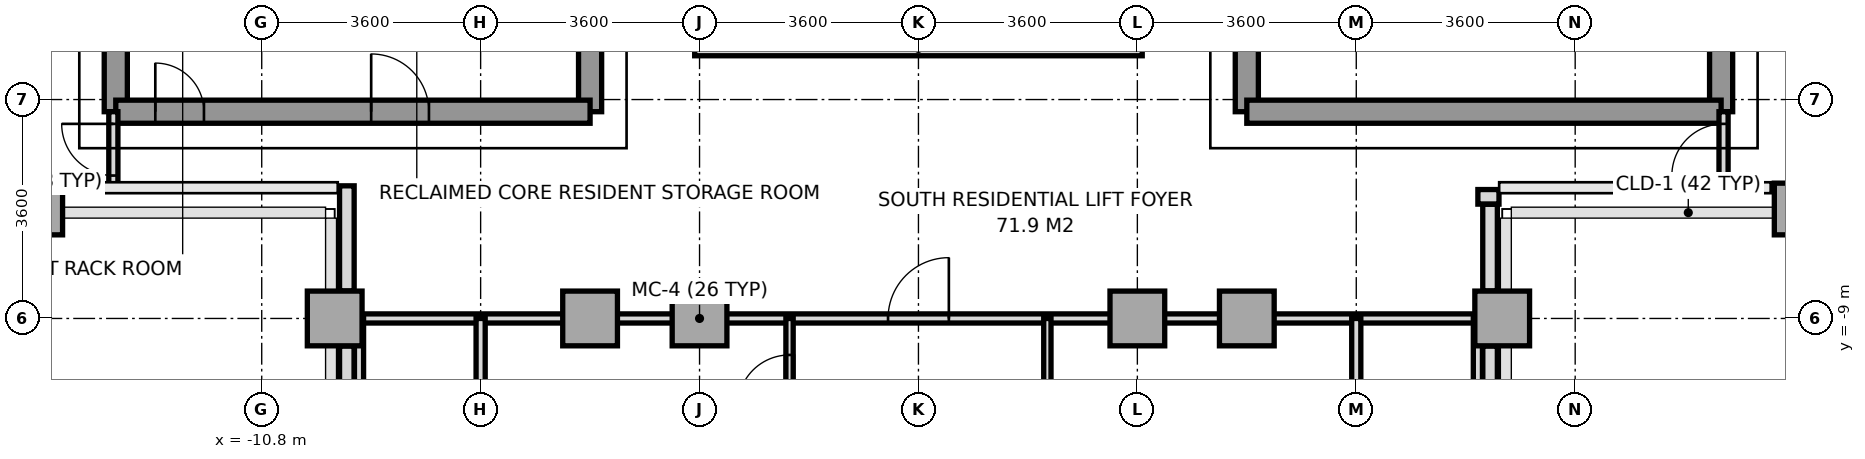
"""IFC4 building model, lengths in metres.
Left out: names, types, materials, properties, quantities, classifications, styles, units other than length and angle.
Written with IfcOpenShell. Run it as: python <this file> out.ifc"""

import sys

from ifc_helpers import new_model, si_unit, direction, frame, frame_2d, origin, origin_2d, place, context, subcontext, project, spatial, rectangle, extrude, source, transform, mapped, element, fill, save


model = new_model("IFC4")
c1 = context("Model", 3, precision=1e-05, world=origin(), true_north=direction((0.0, 1.0)))
c2 = subcontext(c1, "Body", "Model", "MODEL_VIEW")
j1 = project(units=[si_unit("LENGTHUNIT", "METRE"), si_unit("PLANEANGLEUNIT", "RADIAN")], contexts=[c1])
p1 = place(None, origin())
s1 = spatial("IfcSite", under=j1, at=p1, CompositionType="ELEMENT")
p2 = place(p1, origin())
s2 = spatial("IfcBuilding", under=s1, at=p2, CompositionType="ELEMENT")
p3 = place(p2, frame((0.0, 0.0, 204.6)))
s3 = spatial("IfcBuildingStorey", under=s2, at=p3, CompositionType="ELEMENT", Elevation=204.6)
m1 = source(origin(), c2, "Body", "SweptSolid", [
    extrude(rectangle(XDim=0.65, YDim=0.85, at=origin_2d()), origin(), (0.0, 0.0, 1.0), 3.2),
])
p4 = place(p3, frame((-14.4, -7.2, 0.0), z_axis=(0.0, 0.0, 1.0), x_axis=(1.0, 0.0, 0.0)))
e1 = element("IfcColumn", 1, at=p4, inside=s3, PredefinedType="COLUMN", context=c2, shape_type="MappedRepresentation", body=[
    mapped(m1, transform((0.0, 0.0, 0.0), x_axis=(1.0, 0.0, 0.0), y_axis=(0.0, 1.0, 0.0), z_axis=(0.0, 0.0, 1.0), scale=1.0)),
])
m2 = source(origin(), c2, "Body", "SweptSolid", [
    extrude(rectangle(XDim=0.9, YDim=0.9, at=origin_2d()), origin(), (0.0, 0.0, 1.0), 3.2),
])
for number, where, z_axis, x_axis in (
    (2, (-9.6, -9.0, 0.0), (0.0, 0.0, 1.0), (1.0, 0.0, 0.0)),
    (3, (-5.4, -9.0, 0.0), (0.0, 0.0, 1.0), (1.0, 0.0, 0.0)),
    (4, (-3.6, -9.0, 0.0), (0.0, 0.0, 1.0), (1.0, 0.0, 0.0)),
    (5, (3.6, -9.0, 0.0), (0.0, 0.0, 1.0), (1.0, 0.0, 0.0)),
    (6, (5.4, -9.0, 0.0), (0.0, 0.0, 1.0), (1.0, 0.0, 0.0)),
    (7, (9.6, -9.0, 0.0), (0.0, 0.0, 1.0), (1.0, 0.0, 0.0)),
):
    element("IfcColumn", number, at=place(p3, frame(where, z_axis=z_axis, x_axis=x_axis)), inside=s3, PredefinedType="COLUMN", context=c2, shape_type="MappedRepresentation", body=[
        mapped(m2, transform((0.0, 0.0, 0.0), x_axis=(1.0, 0.0, 0.0), y_axis=(0.0, 1.0, 0.0), z_axis=(0.0, 0.0, 1.0), scale=1.0)),
    ])
p5 = place(p3, frame((14.4, -7.2, 0.0), z_axis=(0.0, 0.0, 1.0), x_axis=(1.0, 0.0, 0.0)))
e8 = element("IfcColumn", 8, at=p5, inside=s3, PredefinedType="COLUMN", context=c2, shape_type="MappedRepresentation", body=[
    mapped(m1, transform((0.0, 0.0, 0.0), x_axis=(1.0, 0.0, 0.0), y_axis=(0.0, 1.0, 0.0), z_axis=(0.0, 0.0, 1.0), scale=1.0)),
])
p6 = place(p3, frame((9.547, -7.0, 0.0), z_axis=(0.0, 0.0, 1.0), x_axis=(-1.0, 0.0, 0.0)))
e9 = element("IfcWall", 9, at=p6, inside=s3, PredefinedType="PARAPET", context=c2, shape_type="SweptSolid", body=[
    extrude(rectangle(XDim=0.347, YDim=0.24, at=frame_2d((0.174, 0.0))), origin(), (0.0, 0.0, 1.0), 1.15),
])
p7 = place(p3, frame((9.4, -7.123, 0.0), z_axis=(0.0, 0.0, 1.0), x_axis=(0.0, -1.0, 0.0)))
e10 = element("IfcWall", 10, at=p7, inside=s3, PredefinedType="PARAPET", context=c2, shape_type="SweptSolid", body=[
    extrude(rectangle(XDim=1.424, YDim=0.24, at=frame_2d((0.712, 0.0))), origin(), (0.0, 0.0, 1.0), 1.15),
])
p8 = place(p3, frame((9.4, -9.453, 0.0), z_axis=(0.0, 0.0, 1.0), x_axis=(0.0, -1.0, 0.0)))
e11 = element("IfcWall", 11, at=p8, inside=s3, PredefinedType="PARAPET", context=c2, shape_type="SweptSolid", body=[
    extrude(rectangle(XDim=6.15, YDim=0.24, at=frame_2d((3.075, 0.0))), origin(), (0.0, 0.0, 1.0), 1.15),
])
p9 = place(p3, frame((-9.4, -15.358, 0.0), z_axis=(0.0, 0.0, 1.0), x_axis=(0.0, 1.0, 0.0)))
e12 = element("IfcWall", 12, at=p9, inside=s3, PredefinedType="PARAPET", context=c2, shape_type="SweptSolid", body=[
    extrude(rectangle(XDim=5.905, YDim=0.24, at=frame_2d((2.952, 0.0))), origin(), (0.0, 0.0, 1.0), 1.15),
])
p10 = place(p3, frame((-9.4, -8.547, 0.0), z_axis=(0.0, 0.0, 1.0), x_axis=(0.0, 1.0, 0.0)))
e13 = element("IfcWall", 13, at=p10, inside=s3, PredefinedType="PARAPET", context=c2, shape_type="SweptSolid", body=[
    extrude(rectangle(XDim=1.728, YDim=0.24, at=frame_2d((0.864, 0.0))), origin(), (0.0, 0.0, 1.0), 1.15),
])
p11 = place(p3, frame((-13.2, -5.6, 0.0), z_axis=(0.0, 0.0, 1.0), x_axis=(0.0, 1.0, 0.0)))
e14 = element("IfcWall", 14, at=p11, inside=s3, PredefinedType="SHEAR", context=c2, shape_type="SweptSolid", body=[
    extrude(rectangle(XDim=11.2, YDim=0.38, at=frame_2d((5.6, 0.0))), origin(), (0.0, 0.0, 1.0), 3.2),
])
p12 = place(p3, frame((-5.4, -5.6, 0.0), z_axis=(0.0, 0.0, 1.0), x_axis=(0.0, 1.0, 0.0)))
e15 = element("IfcWall", 15, at=p12, inside=s3, PredefinedType="SHEAR", context=c2, shape_type="SweptSolid", body=[
    extrude(rectangle(XDim=12.5, YDim=0.38, at=frame_2d((6.25, 0.0))), origin(), (0.0, 0.0, 1.0), 3.2),
])
p13 = place(p12, frame((4.55, 0.0, 0.0)))
e16 = element("IfcOpeningElement", 16, at=p13, cuts=e15, PredefinedType="OPENING", context=c2, shape_type="SweptSolid", body=[
    extrude(rectangle(XDim=1.2, YDim=2.2, at=frame_2d((0.6, 1.1))), frame((0.0, 0.2, 0.0), z_axis=(0.0, -1.0, 0.0), x_axis=(1.0, 0.0, 0.0)), (0.0, 0.0, 1.0), 0.4),
])
p14 = place(p12, frame((10.45, 0.0, 0.0)))
e17 = element("IfcOpeningElement", 17, at=p14, cuts=e15, PredefinedType="OPENING", context=c2, shape_type="SweptSolid", body=[
    extrude(rectangle(XDim=1.2, YDim=2.2, at=frame_2d((0.6, 1.1))), frame((0.0, 0.2, 0.0), z_axis=(0.0, -1.0, 0.0), x_axis=(1.0, 0.0, 0.0)), (0.0, 0.0, 1.0), 0.4),
])
p15 = place(p12, frame((6.86, 0.0, 0.0)))
e18 = element("IfcOpeningElement", 18, at=p15, cuts=e15, PredefinedType="OPENING", context=c2, shape_type="SweptSolid", body=[
    extrude(rectangle(XDim=0.8, YDim=2.1, at=frame_2d((0.4, 1.05))), frame((0.0, 0.2, 0.0), z_axis=(0.0, -1.0, 0.0), x_axis=(1.0, 0.0, 0.0)), (0.0, 0.0, 1.0), 0.4),
])
p16 = place(p3, frame((-13.2, -5.6, 0.0), z_axis=(0.0, 0.0, 1.0), x_axis=(1.0, 0.0, 0.0)))
e19 = element("IfcWall", 19, at=p16, inside=s3, PredefinedType="SHEAR", context=c2, shape_type="SweptSolid", body=[
    extrude(rectangle(XDim=7.8, YDim=0.38, at=frame_2d((3.9, 0.0))), origin(), (0.0, 0.0, 1.0), 3.2),
])
p17 = place(p16, frame((0.65, 0.0, 0.0)))
e20 = element("IfcOpeningElement", 20, at=p17, cuts=e19, PredefinedType="OPENING", context=c2, shape_type="SweptSolid", body=[
    extrude(rectangle(XDim=0.8, YDim=2.1, at=frame_2d((0.4, 1.05))), frame((0.0, 0.2, 0.0), z_axis=(0.0, -1.0, 0.0), x_axis=(1.0, 0.0, 0.0)), (0.0, 0.0, 1.0), 0.4),
])
p18 = place(p16, frame((4.2, 0.0, 0.0)))
e21 = element("IfcOpeningElement", 21, at=p18, cuts=e19, PredefinedType="OPENING", context=c2, shape_type="SweptSolid", body=[
    extrude(rectangle(XDim=0.95, YDim=2.15, at=frame_2d((0.475, 1.075))), frame((0.0, 0.2, 0.0), z_axis=(0.0, -1.0, 0.0), x_axis=(1.0, 0.0, 0.0)), (0.0, 0.0, 1.0), 0.4),
])
p19 = place(p3, frame((13.2, -5.6, 0.0), z_axis=(0.0, 0.0, 1.0), x_axis=(0.0, 1.0, 0.0)))
e22 = element("IfcWall", 22, at=p19, inside=s3, PredefinedType="SHEAR", context=c2, shape_type="SweptSolid", body=[
    extrude(rectangle(XDim=11.2, YDim=0.38, at=frame_2d((5.6, 0.0))), origin(), (0.0, 0.0, 1.0), 3.2),
])
p20 = place(p3, frame((5.4, -5.6, 0.0), z_axis=(0.0, 0.0, 1.0), x_axis=(0.0, 1.0, 0.0)))
e23 = element("IfcWall", 23, at=p20, inside=s3, PredefinedType="SHEAR", context=c2, shape_type="SweptSolid", body=[
    extrude(rectangle(XDim=12.5, YDim=0.38, at=frame_2d((6.25, 0.0))), origin(), (0.0, 0.0, 1.0), 3.2),
])
p21 = place(p20, frame((4.55, 0.0, 0.0)))
e24 = element("IfcOpeningElement", 24, at=p21, cuts=e23, PredefinedType="OPENING", context=c2, shape_type="SweptSolid", body=[
    extrude(rectangle(XDim=1.2, YDim=2.2, at=frame_2d((0.6, 1.1))), frame((0.0, 0.2, 0.0), z_axis=(0.0, -1.0, 0.0), x_axis=(1.0, 0.0, 0.0)), (0.0, 0.0, 1.0), 0.4),
])
p22 = place(p20, frame((10.45, 0.0, 0.0)))
e25 = element("IfcOpeningElement", 25, at=p22, cuts=e23, PredefinedType="OPENING", context=c2, shape_type="SweptSolid", body=[
    extrude(rectangle(XDim=1.2, YDim=2.2, at=frame_2d((0.6, 1.1))), frame((0.0, 0.2, 0.0), z_axis=(0.0, -1.0, 0.0), x_axis=(1.0, 0.0, 0.0)), (0.0, 0.0, 1.0), 0.4),
])
p23 = place(p20, frame((6.86, 0.0, 0.0)))
e26 = element("IfcOpeningElement", 26, at=p23, cuts=e23, PredefinedType="OPENING", context=c2, shape_type="SweptSolid", body=[
    extrude(rectangle(XDim=0.8, YDim=2.1, at=frame_2d((0.4, 1.05))), frame((0.0, 0.2, 0.0), z_axis=(0.0, -1.0, 0.0), x_axis=(1.0, 0.0, 0.0)), (0.0, 0.0, 1.0), 0.4),
])
p24 = place(p3, frame((5.4, -5.6, 0.0), z_axis=(0.0, 0.0, 1.0), x_axis=(1.0, 0.0, 0.0)))
e27 = element("IfcWall", 27, at=p24, inside=s3, PredefinedType="SHEAR", context=c2, shape_type="SweptSolid", body=[
    extrude(rectangle(XDim=7.8, YDim=0.38, at=frame_2d((3.9, 0.0))), origin(), (0.0, 0.0, 1.0), 3.2),
])
p25 = place(p3, frame((-9.55, -9.0, 0.0), z_axis=(0.0, 0.0, 1.0), x_axis=(1.0, 0.0, 0.0)))
e28 = element("IfcWall", 28, at=p25, inside=s3, PredefinedType="PARTITIONING", context=c2, shape_type="SweptSolid", body=[
    extrude(rectangle(XDim=19.1, YDim=0.15, at=frame_2d((9.55, 0.0))), origin(), (0.0, 0.0, 1.0), 2.75),
])
p26 = place(p25, frame((9.05, 0.0, 0.0)))
e29 = element("IfcOpeningElement", 29, at=p26, cuts=e28, PredefinedType="OPENING", context=c2, shape_type="SweptSolid", body=[
    extrude(rectangle(XDim=1.0, YDim=2.2, at=frame_2d((0.5, 1.1))), frame((0.0, 0.085, 0.0), z_axis=(0.0, -1.0, 0.0), x_axis=(1.0, 0.0, 0.0)), (0.0, 0.0, 1.0), 0.17),
])
for number, where, z_axis, x_axis in (
    (30, (-9.2, -15.68, 0.0), (0.0, 0.0, 1.0), (0.0, 1.0, 0.0)),
    (31, (9.2, -15.68, 0.0), (0.0, 0.0, 1.0), (0.0, 1.0, 0.0)),
):
    element("IfcWall", number, at=place(p3, frame(where, z_axis=z_axis, x_axis=x_axis)), inside=s3, PredefinedType="PARTITIONING", context=c2, shape_type="SweptSolid", body=[
        extrude(rectangle(XDim=6.68, YDim=0.15, at=frame_2d((3.34, 0.0))), origin(), (0.0, 0.0, 1.0), 2.75),
    ])
for number, where, z_axis, x_axis in (
    (32, (-7.2, -21.02, 0.0), (0.0, 0.0, 1.0), (0.0, 1.0, 0.0)),
    (33, (7.2, -21.02, 0.0), (0.0, 0.0, 1.0), (0.0, 1.0, 0.0)),
):
    element("IfcWall", number, at=place(p3, frame(where, z_axis=z_axis, x_axis=x_axis)), inside=s3, PredefinedType="PARTITIONING", context=c2, shape_type="SweptSolid", body=[
        extrude(rectangle(XDim=12.02, YDim=0.15, at=frame_2d((6.01, 0.0))), origin(), (0.0, 0.0, 1.0), 2.75),
    ])
p27 = place(p3, frame((-2.12, -18.0, 0.0), z_axis=(0.0, 0.0, 1.0), x_axis=(0.0, 1.0, 0.0)))
e34 = element("IfcWall", 34, at=p27, inside=s3, PredefinedType="PARTITIONING", context=c2, shape_type="SweptSolid", body=[
    extrude(rectangle(XDim=9.0, YDim=0.12, at=frame_2d((4.5, 0.0))), origin(), (0.0, 0.0, 1.0), 2.75),
])
p28 = place(p27, frame((7.55, 0.0, 0.0)))
e35 = element("IfcOpeningElement", 35, at=p28, cuts=e34, PredefinedType="OPENING", context=c2, shape_type="SweptSolid", body=[
    extrude(rectangle(XDim=0.85, YDim=2.1, at=frame_2d((0.425, 1.05))), frame((0.0, 0.07, 0.0), z_axis=(0.0, -1.0, 0.0), x_axis=(1.0, 0.0, 0.0)), (0.0, 0.0, 1.0), 0.14),
])
p29 = place(p27, frame((0.5, 0.0, 0.0)))
e36 = element("IfcOpeningElement", 36, at=p29, cuts=e34, PredefinedType="OPENING", context=c2, shape_type="SweptSolid", body=[
    extrude(rectangle(XDim=0.95, YDim=2.15, at=frame_2d((0.475, 1.075))), frame((0.0, 0.07, 0.0), z_axis=(0.0, -1.0, 0.0), x_axis=(1.0, 0.0, 0.0)), (0.0, 0.0, 1.0), 0.14),
])
p30 = place(p3, frame((2.12, -18.0, 0.0), z_axis=(0.0, 0.0, 1.0), x_axis=(0.0, 1.0, 0.0)))
e37 = element("IfcWall", 37, at=p30, inside=s3, PredefinedType="PARTITIONING", context=c2, shape_type="SweptSolid", body=[
    extrude(rectangle(XDim=9.0, YDim=0.12, at=frame_2d((4.5, 0.0))), origin(), (0.0, 0.0, 1.0), 2.75),
])
p31 = place(p30, frame((1.6, 0.0, 0.0)))
e38 = element("IfcOpeningElement", 38, at=p31, cuts=e37, PredefinedType="OPENING", context=c2, shape_type="SweptSolid", body=[
    extrude(rectangle(XDim=0.95, YDim=2.15, at=frame_2d((0.475, 1.075))), frame((0.0, 0.07, 0.0), z_axis=(0.0, -1.0, 0.0), x_axis=(1.0, 0.0, 0.0)), (0.0, 0.0, 1.0), 0.14),
])
p32 = place(p3, frame((-13.24, -6.85, 0.0), z_axis=(0.0, 0.0, 1.0), x_axis=(0.0, 1.0, 0.0)))
e39 = element("IfcWall", 39, at=p32, inside=s3, PredefinedType="PARTITIONING", context=c2, shape_type="SweptSolid", body=[
    extrude(rectangle(XDim=1.25, YDim=0.15, at=frame_2d((0.625, 0.0))), origin(), (0.0, 0.0, 1.0), 3.2),
])
p33 = place(p32, frame((0.2, 0.0, 0.0)))
e40 = element("IfcOpeningElement", 40, at=p33, cuts=e39, PredefinedType="OPENING", context=c2, shape_type="SweptSolid", body=[
    extrude(rectangle(XDim=0.85, YDim=2.1, at=frame_2d((0.425, 1.05))), frame((0.0, 0.085, 0.0), z_axis=(0.0, -1.0, 0.0), x_axis=(1.0, 0.0, 0.0)), (0.0, 0.0, 1.0), 0.17),
])
p34 = place(p3, frame((13.24, -6.85, 0.0), z_axis=(0.0, 0.0, 1.0), x_axis=(0.0, 1.0, 0.0)))
e41 = element("IfcWall", 41, at=p34, inside=s3, PredefinedType="PARTITIONING", context=c2, shape_type="SweptSolid", body=[
    extrude(rectangle(XDim=1.25, YDim=0.15, at=frame_2d((0.625, 0.0))), origin(), (0.0, 0.0, 1.0), 3.2),
])
p35 = place(p34, frame((0.2, 0.0, 0.0)))
e42 = element("IfcOpeningElement", 42, at=p35, cuts=e41, PredefinedType="OPENING", context=c2, shape_type="SweptSolid", body=[
    extrude(rectangle(XDim=0.85, YDim=2.1, at=frame_2d((0.425, 1.05))), frame((0.0, 0.085, 0.0), z_axis=(0.0, -1.0, 0.0), x_axis=(1.0, 0.0, 0.0)), (0.0, 0.0, 1.0), 0.17),
])
p36 = place(p3, frame((-3.68, -4.56, 0.0), z_axis=(0.0, 0.0, 1.0), x_axis=(1.0, 0.0, 0.0)))
e43 = element("IfcWall", 43, at=p36, inside=s3, PredefinedType="PARAPET", context=c2, shape_type="SweptSolid", body=[
    extrude(rectangle(XDim=7.36, YDim=0.24, at=frame_2d((3.68, 0.0))), origin(), (0.0, 0.0, 1.0), 1.15),
])
m3 = source(origin(), c2, "Body", "SweptSolid", [
    extrude(rectangle(XDim=0.8, YDim=2.1, at=frame_2d((0.4, 1.05))), frame((0.0, 0.025, 0.0), z_axis=(0.0, -1.0, 0.0), x_axis=(1.0, 0.0, 0.0)), (0.0, 0.0, 1.0), 0.05),
])
p37 = place(p17, origin())
e44 = element("IfcDoor", 44, at=p37, inside=s3, OperationType="SINGLE_SWING_LEFT", PredefinedType="DOOR", context=c2, shape_type="MappedRepresentation", body=[
    mapped(m3, transform((0.0, 0.0, 0.0), x_axis=(1.0, 0.0, 0.0), y_axis=(0.0, 1.0, 0.0), z_axis=(0.0, 0.0, 1.0), scale=1.0)),
])
fill(e20, e44)
m4 = source(origin(), c2, "Body", "SweptSolid", [
    extrude(rectangle(XDim=0.95, YDim=2.15, at=frame_2d((0.475, 1.075))), frame((0.0, 0.025, 0.0), z_axis=(0.0, -1.0, 0.0), x_axis=(1.0, 0.0, 0.0)), (0.0, 0.0, 1.0), 0.05),
])
p38 = place(p18, origin())
e45 = element("IfcDoor", 45, at=p38, inside=s3, OperationType="SINGLE_SWING_LEFT", PredefinedType="DOOR", context=c2, shape_type="MappedRepresentation", body=[
    mapped(m4, transform((0.0, 0.0, 0.0), x_axis=(1.0, 0.0, 0.0), y_axis=(0.0, 1.0, 0.0), z_axis=(0.0, 0.0, 1.0), scale=1.0)),
])
fill(e21, e45)
m5 = source(origin(), c2, "Body", "SweptSolid", [
    extrude(rectangle(XDim=1.0, YDim=2.2, at=frame_2d((0.5, 1.1))), frame((0.0, 0.025, 0.0), z_axis=(0.0, -1.0, 0.0), x_axis=(1.0, 0.0, 0.0)), (0.0, 0.0, 1.0), 0.05),
])
p39 = place(p26, origin())
e46 = element("IfcDoor", 46, at=p39, inside=s3, OperationType="SINGLE_SWING_RIGHT", PredefinedType="DOOR", context=c2, shape_type="MappedRepresentation", body=[
    mapped(m5, transform((0.0, 0.0, 0.0), x_axis=(1.0, 0.0, 0.0), y_axis=(0.0, 1.0, 0.0), z_axis=(0.0, 0.0, 1.0), scale=1.0)),
])
fill(e29, e46)
m6 = source(origin(), c2, "Body", "SweptSolid", [
    extrude(rectangle(XDim=0.85, YDim=2.1, at=frame_2d((0.425, 1.05))), frame((0.0, 0.025, 0.0), z_axis=(0.0, -1.0, 0.0), x_axis=(1.0, 0.0, 0.0)), (0.0, 0.0, 1.0), 0.05),
])
p40 = place(p28, origin())
e47 = element("IfcDoor", 47, at=p40, inside=s3, OperationType="SINGLE_SWING_LEFT", PredefinedType="DOOR", context=c2, shape_type="MappedRepresentation", body=[
    mapped(m6, transform((0.0, 0.0, 0.0), x_axis=(1.0, 0.0, 0.0), y_axis=(0.0, 1.0, 0.0), z_axis=(0.0, 0.0, 1.0), scale=1.0)),
])
fill(e35, e47)
p41 = place(p33, origin())
e48 = element("IfcDoor", 48, at=p41, inside=s3, OperationType="SINGLE_SWING_RIGHT", PredefinedType="DOOR", context=c2, shape_type="MappedRepresentation", body=[
    mapped(m6, transform((0.0, 0.0, 0.0), x_axis=(1.0, 0.0, 0.0), y_axis=(0.0, 1.0, 0.0), z_axis=(0.0, 0.0, 1.0), scale=1.0)),
])
fill(e40, e48)
p42 = place(p35, origin())
e49 = element("IfcDoor", 49, at=p42, inside=s3, OperationType="SINGLE_SWING_LEFT", PredefinedType="DOOR", context=c2, shape_type="MappedRepresentation", body=[
    mapped(m6, transform((0.0, 0.0, 0.0), x_axis=(1.0, 0.0, 0.0), y_axis=(0.0, 1.0, 0.0), z_axis=(0.0, 0.0, 1.0), scale=1.0)),
])
fill(e42, e49)
save(model, sys.argv[1])
